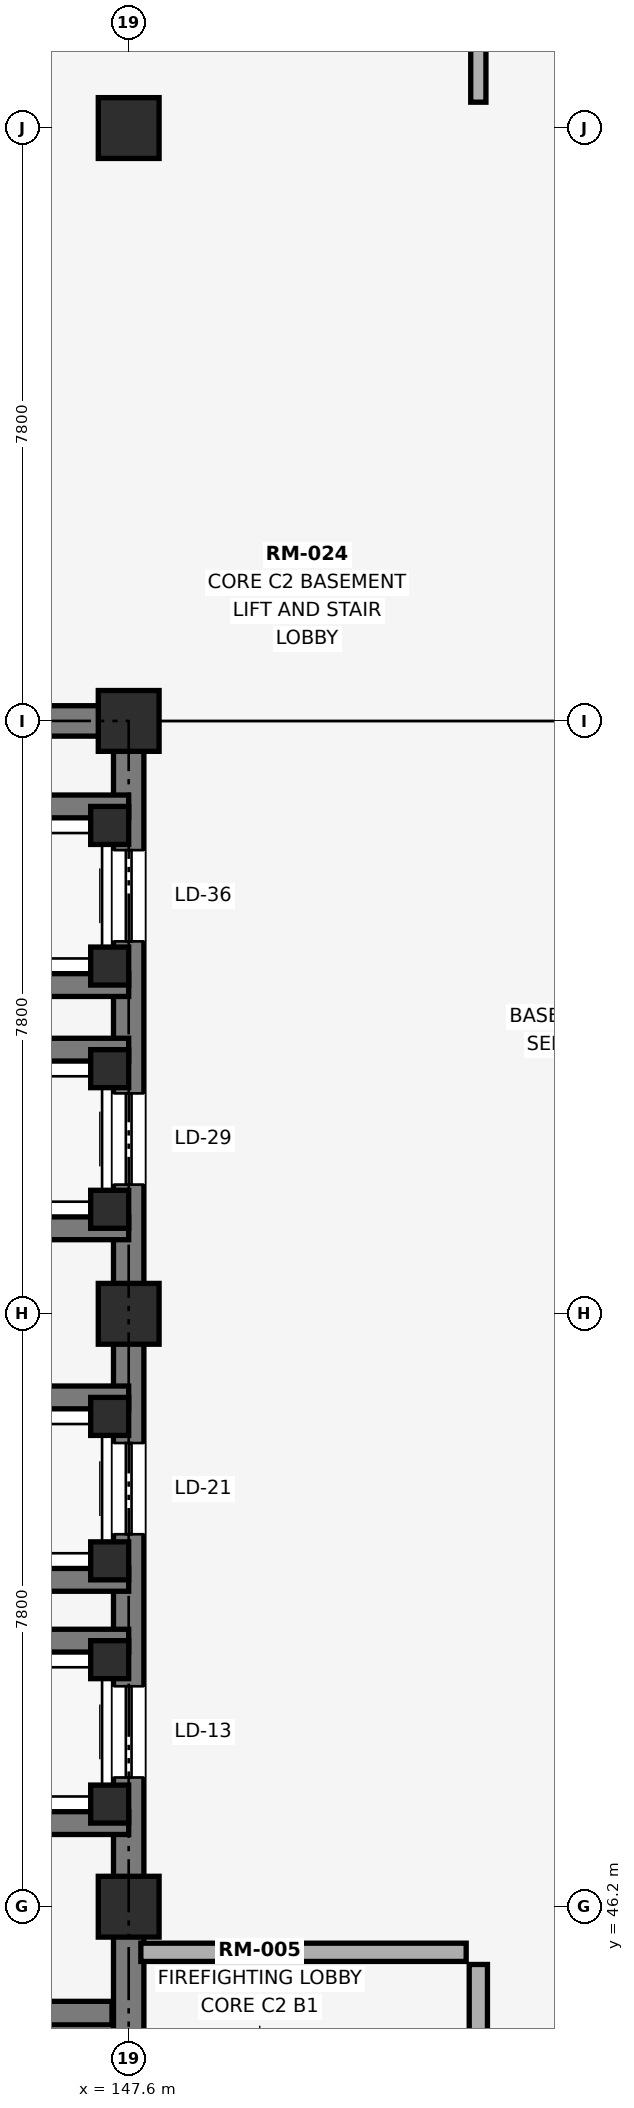
"""IFC4 building model, lengths in metres.
Left out: names, types, materials, properties, quantities, classifications, styles, units other than length and angle.
Written with IfcOpenShell. Run it as: python <this file> out.ifc"""

import sys

from ifc_helpers import new_model, si_unit, direction, frame, frame_2d, origin, origin_2d, place, context, subcontext, project, spatial, rectangle, extrude, element, fill, save


model = new_model("IFC4")
c1 = context("Model", 3, precision=1e-05, world=origin(), true_north=direction((0.0, 1.0)))
c2 = subcontext(c1, "Body", "Model", "MODEL_VIEW")
j1 = project(units=[si_unit("LENGTHUNIT", "METRE"), si_unit("PLANEANGLEUNIT", "RADIAN")], contexts=[c1])
p1 = place(None, origin())
s1 = spatial("IfcSite", under=j1, at=p1, CompositionType="ELEMENT")
p2 = place(p1, origin())
s2 = spatial("IfcBuilding", under=s1, at=p2, CompositionType="ELEMENT")
p3 = place(p2, frame((0.0, 0.0, -4.8)))
s3 = spatial("IfcBuildingStorey", under=s2, at=p3, CompositionType="ELEMENT", Elevation=-4.8)
for number, where, z_axis, x_axis in (
    (1, (147.6, 46.2, -0.45), (0.0, 0.0, 1.0), (1.0, 0.0, 0.0)),
    (2, (147.6, 54.0, -0.45), (0.0, 0.0, 1.0), (1.0, 0.0, 0.0)),
    (3, (147.6, 61.8, -0.45), (0.0, 0.0, 1.0), (1.0, 0.0, 0.0)),
    (4, (147.6, 69.6, -0.45), (0.0, 0.0, 1.0), (1.0, 0.0, 0.0)),
):
    element("IfcColumn", number, at=place(p3, frame(where, z_axis=z_axis, x_axis=x_axis)), inside=s3, PredefinedType="COLUMN", context=c2, shape_type="SweptSolid", body=[
        extrude(rectangle(XDim=0.8, YDim=0.8, at=origin_2d()), origin(), (0.0, 0.0, 1.0), 5.25),
    ])
p4 = place(p3, frame((137.8, 61.8, 0.0), z_axis=(0.0, 0.0, 1.0), x_axis=(1.0, 0.0, 0.0)))
e5 = element("IfcWall", 5, at=p4, inside=s3, PredefinedType="SHEAR", context=c2, shape_type="SweptSolid", body=[
    extrude(rectangle(XDim=10.0, YDim=0.4, at=frame_2d((5.0, 0.0))), origin(), (0.0, 0.0, 1.0), 4.8),
])
p5 = place(p3, frame((147.6, 38.6, 0.0), z_axis=(0.0, 0.0, 1.0), x_axis=(0.0, 1.0, 0.0)))
e6 = element("IfcWall", 6, at=p5, inside=s3, PredefinedType="SHEAR", context=c2, shape_type="SweptSolid", body=[
    extrude(rectangle(XDim=23.0, YDim=0.4, at=frame_2d((11.5, 0.0))), origin(), (0.0, 0.0, 1.0), 4.8),
])
p6 = place(p5, frame((9.3, 0.0, 0.0)))
e7 = element("IfcOpeningElement", 7, at=p6, cuts=e6, PredefinedType="OPENING", context=c2, shape_type="SweptSolid", body=[
    extrude(rectangle(XDim=1.2, YDim=2.2, at=frame_2d((0.6, 1.1))), frame((0.0, 0.21, 0.0), z_axis=(0.0, -1.0, 0.0), x_axis=(1.0, 0.0, 0.0)), (0.0, 0.0, 1.0), 0.42),
])
p7 = place(p5, frame((12.5, 0.0, 0.0)))
e8 = element("IfcOpeningElement", 8, at=p7, cuts=e6, PredefinedType="OPENING", context=c2, shape_type="SweptSolid", body=[
    extrude(rectangle(XDim=1.2, YDim=2.2, at=frame_2d((0.6, 1.1))), frame((0.0, 0.21, 0.0), z_axis=(0.0, -1.0, 0.0), x_axis=(1.0, 0.0, 0.0)), (0.0, 0.0, 1.0), 0.42),
])
p8 = place(p5, frame((17.1, 0.0, 0.0)))
e9 = element("IfcOpeningElement", 9, at=p8, cuts=e6, PredefinedType="OPENING", context=c2, shape_type="SweptSolid", body=[
    extrude(rectangle(XDim=1.2, YDim=2.2, at=frame_2d((0.6, 1.1))), frame((0.0, 0.21, 0.0), z_axis=(0.0, -1.0, 0.0), x_axis=(1.0, 0.0, 0.0)), (0.0, 0.0, 1.0), 0.42),
])
p9 = place(p5, frame((20.3, 0.0, 0.0)))
e10 = element("IfcOpeningElement", 10, at=p9, cuts=e6, PredefinedType="OPENING", context=c2, shape_type="SweptSolid", body=[
    extrude(rectangle(XDim=1.2, YDim=2.2, at=frame_2d((0.6, 1.1))), frame((0.0, 0.21, 0.0), z_axis=(0.0, -1.0, 0.0), x_axis=(1.0, 0.0, 0.0)), (0.0, 0.0, 1.0), 0.42),
])
p10 = place(p5, frame((2.4, 0.0, 0.0)))
e11 = element("IfcOpeningElement", 11, at=p10, cuts=e6, PredefinedType="OPENING", context=c2, shape_type="SweptSolid", body=[
    extrude(rectangle(XDim=1.1, YDim=2.2, at=frame_2d((0.55, 1.1))), frame((0.0, 0.21, 0.0), z_axis=(0.0, -1.0, 0.0), x_axis=(1.0, 0.0, 0.0)), (0.0, 0.0, 1.0), 0.42),
])
p11 = place(p3, frame((138.22, 44.8, 0.0), z_axis=(0.0, 0.0, 1.0), x_axis=(1.0, 0.0, 0.0)))
e12 = element("IfcWall", 12, at=p11, inside=s3, PredefinedType="SHEAR", context=c2, shape_type="SweptSolid", body=[
    extrude(rectangle(XDim=9.16, YDim=0.31, at=frame_2d((4.58, 0.0))), origin(), (0.0, 0.0, 1.0), 4.8),
])
for number, where, z_axis, x_axis in (
    (13, (147.35, 47.55, -2.48), (0.0, 0.0, 1.0), (1.0, 0.0, 0.0)),
    (14, (147.35, 49.45, -2.48), (0.0, 0.0, 1.0), (1.0, 0.0, 0.0)),
):
    element("IfcColumn", number, at=place(p3, frame(where, z_axis=z_axis, x_axis=x_axis)), inside=s3, PredefinedType="COLUMN", context=c2, shape_type="SweptSolid", body=[
        extrude(rectangle(XDim=0.5, YDim=0.5, at=origin_2d()), origin(), (0.0, 0.0, 1.0), 0.5),
    ])
for number, where, z_axis, x_axis in (
    (15, (144.75, 47.3, -1.6), (0.0, 0.0, 1.0), (1.0, 0.0, 0.0)),
    (16, (144.75, 49.7, -1.6), (0.0, 0.0, 1.0), (1.0, 0.0, 0.0)),
):
    element("IfcWall", number, at=place(p3, frame(where, z_axis=z_axis, x_axis=x_axis)), inside=s3, PredefinedType="SHEAR", context=c2, shape_type="SweptSolid", body=[
        extrude(rectangle(XDim=2.85, YDim=0.3, at=frame_2d((1.425, 0.0))), origin(), (0.0, 0.0, 1.0), 6.4),
    ])
for number, where, z_axis, x_axis in (
    (17, (147.35, 50.75, -2.48), (0.0, 0.0, 1.0), (1.0, 0.0, 0.0)),
    (18, (147.35, 52.65, -2.48), (0.0, 0.0, 1.0), (1.0, 0.0, 0.0)),
):
    element("IfcColumn", number, at=place(p3, frame(where, z_axis=z_axis, x_axis=x_axis)), inside=s3, PredefinedType="COLUMN", context=c2, shape_type="SweptSolid", body=[
        extrude(rectangle(XDim=0.5, YDim=0.5, at=origin_2d()), origin(), (0.0, 0.0, 1.0), 0.5),
    ])
for number, where, z_axis, x_axis in (
    (19, (144.75, 50.5, -1.6), (0.0, 0.0, 1.0), (1.0, 0.0, 0.0)),
    (20, (144.75, 52.9, -1.6), (0.0, 0.0, 1.0), (1.0, 0.0, 0.0)),
):
    element("IfcWall", number, at=place(p3, frame(where, z_axis=z_axis, x_axis=x_axis)), inside=s3, PredefinedType="SHEAR", context=c2, shape_type="SweptSolid", body=[
        extrude(rectangle(XDim=2.85, YDim=0.3, at=frame_2d((1.425, 0.0))), origin(), (0.0, 0.0, 1.0), 6.4),
    ])
for number, where, z_axis, x_axis in (
    (21, (147.35, 55.375, -2.48), (0.0, 0.0, 1.0), (1.0, 0.0, 0.0)),
    (22, (147.35, 57.225, -2.48), (0.0, 0.0, 1.0), (1.0, 0.0, 0.0)),
):
    element("IfcColumn", number, at=place(p3, frame(where, z_axis=z_axis, x_axis=x_axis)), inside=s3, PredefinedType="COLUMN", context=c2, shape_type="SweptSolid", body=[
        extrude(rectangle(XDim=0.5, YDim=0.5, at=origin_2d()), origin(), (0.0, 0.0, 1.0), 0.5),
    ])
for number, where, z_axis, x_axis in (
    (23, (144.8, 55.125, -1.6), (0.0, 0.0, 1.0), (1.0, 0.0, 0.0)),
    (24, (144.8, 57.475, -1.6), (0.0, 0.0, 1.0), (1.0, 0.0, 0.0)),
):
    element("IfcWall", number, at=place(p3, frame(where, z_axis=z_axis, x_axis=x_axis)), inside=s3, PredefinedType="SHEAR", context=c2, shape_type="SweptSolid", body=[
        extrude(rectangle(XDim=2.8, YDim=0.3, at=frame_2d((1.4, 0.0))), origin(), (0.0, 0.0, 1.0), 6.4),
    ])
for number, where, z_axis, x_axis in (
    (25, (147.35, 58.575, -2.48), (0.0, 0.0, 1.0), (1.0, 0.0, 0.0)),
    (26, (147.35, 60.425, -2.48), (0.0, 0.0, 1.0), (1.0, 0.0, 0.0)),
):
    element("IfcColumn", number, at=place(p3, frame(where, z_axis=z_axis, x_axis=x_axis)), inside=s3, PredefinedType="COLUMN", context=c2, shape_type="SweptSolid", body=[
        extrude(rectangle(XDim=0.5, YDim=0.5, at=origin_2d()), origin(), (0.0, 0.0, 1.0), 0.5),
    ])
for number, where, z_axis, x_axis in (
    (27, (144.8, 58.325, -1.6), (0.0, 0.0, 1.0), (1.0, 0.0, 0.0)),
    (28, (144.8, 60.675, -1.6), (0.0, 0.0, 1.0), (1.0, 0.0, 0.0)),
):
    element("IfcWall", number, at=place(p3, frame(where, z_axis=z_axis, x_axis=x_axis)), inside=s3, PredefinedType="SHEAR", context=c2, shape_type="SweptSolid", body=[
        extrude(rectangle(XDim=2.8, YDim=0.3, at=frame_2d((1.4, 0.0))), origin(), (0.0, 0.0, 1.0), 6.4),
    ])
p12 = place(p3, frame((147.76, 45.6, 0.0), z_axis=(0.0, 0.0, 1.0), x_axis=(1.0, 0.0, 0.0)))
e29 = element("IfcWall", 29, at=p12, inside=s3, PredefinedType="PARTITIONING", context=c2, shape_type="SweptSolid", body=[
    extrude(rectangle(XDim=4.28, YDim=0.24, at=frame_2d((2.14, 0.0))), origin(), (0.0, 0.0, 1.0), 4.49),
])
p13 = place(p3, frame((152.2, 38.56, 0.0), z_axis=(0.0, 0.0, 1.0), x_axis=(0.0, 1.0, 0.0)))
e30 = element("IfcWall", 30, at=p13, inside=s3, PredefinedType="PARTITIONING", context=c2, shape_type="SweptSolid", body=[
    extrude(rectangle(XDim=6.88, YDim=0.24, at=frame_2d((3.44, 0.0))), origin(), (0.0, 0.0, 1.0), 4.49),
])
p14 = place(p13, frame((1.9, 0.0, 0.0)))
e31 = element("IfcOpeningElement", 31, at=p14, cuts=e30, PredefinedType="OPENING", context=c2, shape_type="SweptSolid", body=[
    extrude(rectangle(XDim=1.8, YDim=2.3, at=frame_2d((0.9, 1.15))), frame((0.0, 0.13, 0.0), z_axis=(0.0, -1.0, 0.0), x_axis=(1.0, 0.0, 0.0)), (0.0, 0.0, 1.0), 0.26),
])
p15 = place(p3, frame((152.2, 69.94, 0.0), z_axis=(0.0, 0.0, 1.0), x_axis=(0.0, 1.0, 0.0)))
e32 = element("IfcWall", 32, at=p15, inside=s3, PredefinedType="PARTITIONING", context=c2, shape_type="SweptSolid", body=[
    extrude(rectangle(XDim=14.9, YDim=0.2, at=frame_2d((7.45, 0.0))), origin(), (0.0, 0.0, 1.0), 4.49),
])
p16 = place(p15, frame((3.2, 0.0, 0.0)))
e33 = element("IfcOpeningElement", 33, at=p16, cuts=e32, PredefinedType="OPENING", context=c2, shape_type="SweptSolid", body=[
    extrude(rectangle(XDim=1.05, YDim=2.25, at=frame_2d((0.525, 1.125))), frame((0.0, 0.11, 0.0), z_axis=(0.0, -1.0, 0.0), x_axis=(1.0, 0.0, 0.0)), (0.0, 0.0, 1.0), 0.22),
])
p17 = place(p15, frame((10.5, 0.0, 0.0)))
e34 = element("IfcOpeningElement", 34, at=p17, cuts=e32, PredefinedType="OPENING", context=c2, shape_type="SweptSolid", body=[
    extrude(rectangle(XDim=1.05, YDim=2.25, at=frame_2d((0.525, 1.125))), frame((0.0, 0.11, 0.0), z_axis=(0.0, -1.0, 0.0), x_axis=(1.0, 0.0, 0.0)), (0.0, 0.0, 1.0), 0.22),
])
p18 = place(p6, origin())
e35 = element("IfcDoor", 35, at=p18, inside=s3, OperationType="SLIDING_TO_LEFT", PredefinedType="DOOR", context=c2, shape_type="SweptSolid", body=[
    extrude(rectangle(XDim=1.2, YDim=2.2, at=frame_2d((0.6, 1.1))), frame((0.0, 0.025, 0.0), z_axis=(0.0, -1.0, 0.0), x_axis=(1.0, 0.0, 0.0)), (0.0, 0.0, 1.0), 0.05),
])
fill(e7, e35)
p19 = place(p7, origin())
e36 = element("IfcDoor", 36, at=p19, inside=s3, OperationType="SLIDING_TO_LEFT", PredefinedType="DOOR", context=c2, shape_type="SweptSolid", body=[
    extrude(rectangle(XDim=1.2, YDim=2.2, at=frame_2d((0.6, 1.1))), frame((0.0, 0.025, 0.0), z_axis=(0.0, -1.0, 0.0), x_axis=(1.0, 0.0, 0.0)), (0.0, 0.0, 1.0), 0.05),
])
fill(e8, e36)
p20 = place(p8, origin())
e37 = element("IfcDoor", 37, at=p20, inside=s3, OperationType="SLIDING_TO_LEFT", PredefinedType="DOOR", context=c2, shape_type="SweptSolid", body=[
    extrude(rectangle(XDim=1.2, YDim=2.2, at=frame_2d((0.6, 1.1))), frame((0.0, 0.025, 0.0), z_axis=(0.0, -1.0, 0.0), x_axis=(1.0, 0.0, 0.0)), (0.0, 0.0, 1.0), 0.05),
])
fill(e9, e37)
p21 = place(p9, origin())
e38 = element("IfcDoor", 38, at=p21, inside=s3, OperationType="SLIDING_TO_RIGHT", PredefinedType="DOOR", context=c2, shape_type="SweptSolid", body=[
    extrude(rectangle(XDim=1.2, YDim=2.2, at=frame_2d((0.6, 1.1))), frame((0.0, 0.025, 0.0), z_axis=(0.0, -1.0, 0.0), x_axis=(1.0, 0.0, 0.0)), (0.0, 0.0, 1.0), 0.05),
])
fill(e10, e38)
save(model, sys.argv[1])
